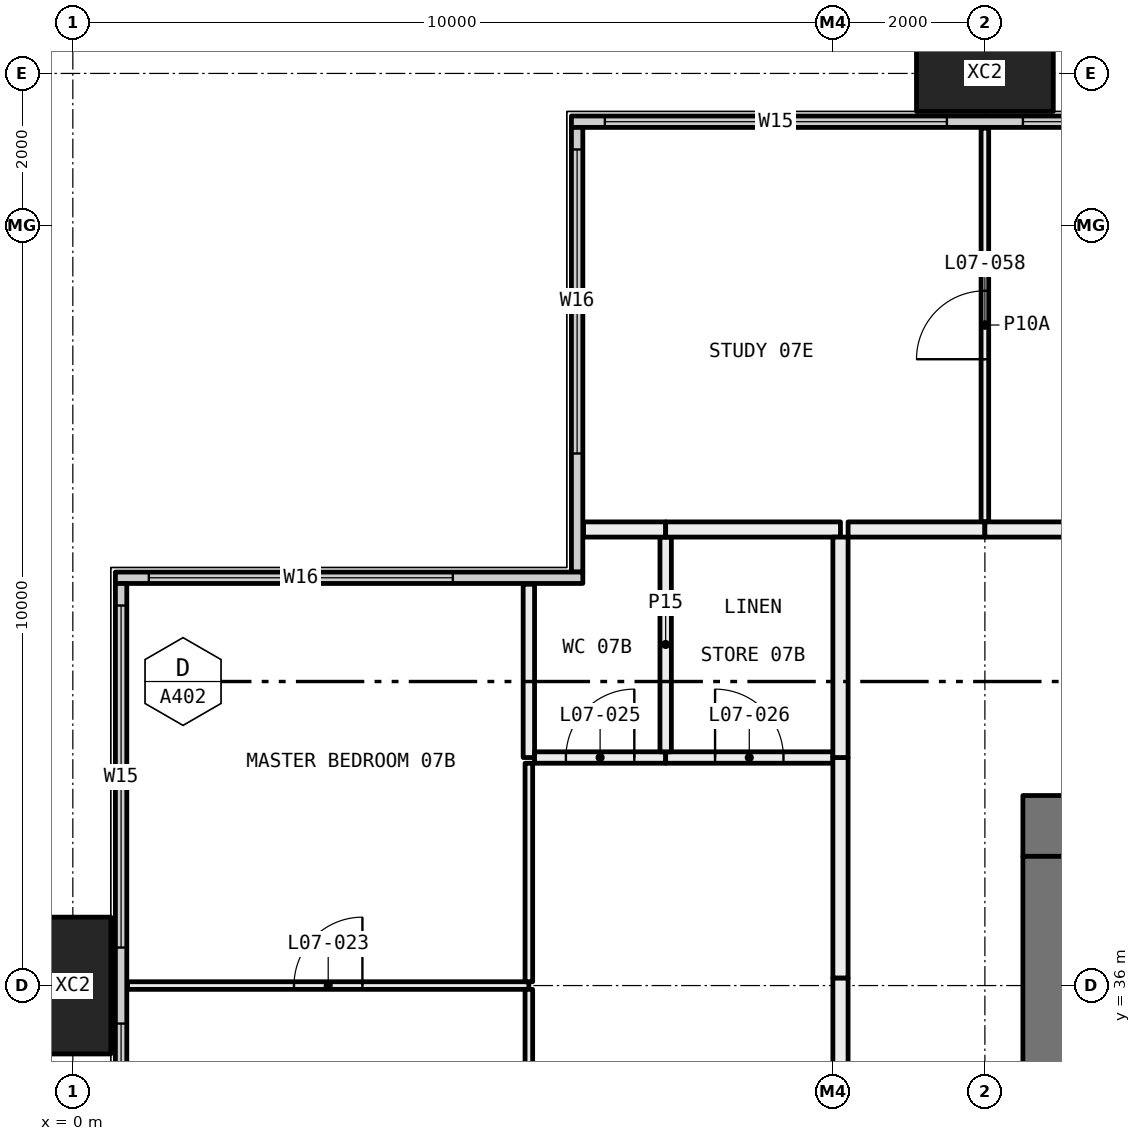
"""IFC4 building model, lengths in metres.
Left out: names, types, materials, properties, quantities, classifications, styles, units other than length and angle.
Written with IfcOpenShell. Run it as: python <this file> out.ifc"""

import sys

from ifc_helpers import new_model, si_unit, direction, frame, frame_2d, origin, origin_2d, place, context, subcontext, project, spatial, rectangle, hollow_rectangle, extrude, element, fill, save


model = new_model("IFC4")
c1 = context("Model", 3, precision=1e-05, world=origin(), true_north=direction((0.0, 1.0)))
c2 = subcontext(c1, "Body", "Model", "MODEL_VIEW")
j1 = project(units=[si_unit("LENGTHUNIT", "METRE"), si_unit("PLANEANGLEUNIT", "RADIAN")], contexts=[c1])
p1 = place(None, origin())
s1 = spatial("IfcSite", under=j1, at=p1, CompositionType="ELEMENT")
p2 = place(p1, origin())
s2 = spatial("IfcBuilding", under=s1, at=p2, CompositionType="ELEMENT")
p3 = place(p2, frame((0.0, 0.0, 36.9)))
s3 = spatial("IfcBuildingStorey", under=s2, at=p3, CompositionType="ELEMENT", Elevation=36.9)
for number, where, z_axis, x_axis in (
    (1, (0.0, 36.0, -0.4), (0.0, 0.0, 1.0), (0.0, 1.0, 0.0)),
    (2, (12.0, 48.0, -0.4), (0.0, 0.0, 1.0), (1.0, 0.0, 0.0)),
):
    element("IfcColumn", number, at=place(p3, frame(where, z_axis=z_axis, x_axis=x_axis)), inside=s3, PredefinedType="COLUMN", context=c2, shape_type="SweptSolid", body=[
        extrude(hollow_rectangle(XDim=1.8, YDim=1.0, WallThickness=0.07, at=origin_2d()), origin(), (0.0, 0.0, 1.0), 3.45),
    ])
p4 = place(p3, frame((6.56, 47.365, 0.0), z_axis=(0.0, 0.0, 1.0), x_axis=(1.0, 0.0, 0.0)))
e3 = element("IfcWall", 3, at=p4, inside=s3, PredefinedType="ELEMENTEDWALL", context=c2, shape_type="SweptSolid", body=[
    extrude(rectangle(XDim=58.88, YDim=0.15, at=frame_2d((29.44, 0.0))), origin(), (0.0, 0.0, 1.0), 3.05),
])
p5 = place(p4, frame((0.44, 0.0, 0.45)))
e4 = element("IfcOpeningElement", 4, at=p5, cuts=e3, PredefinedType="OPENING", context=c2, shape_type="SweptSolid", body=[
    extrude(rectangle(XDim=4.5, YDim=2.55, at=frame_2d((2.25, 1.275))), frame((0.0, 0.085, 0.0), z_axis=(0.0, -1.0, 0.0), x_axis=(1.0, 0.0, 0.0)), (0.0, 0.0, 1.0), 0.17),
])
p6 = place(p4, frame((5.94, 0.0, 0.45)))
e5 = element("IfcOpeningElement", 5, at=p6, cuts=e3, PredefinedType="OPENING", context=c2, shape_type="SweptSolid", body=[
    extrude(rectangle(XDim=3.25, YDim=2.55, at=frame_2d((1.625, 1.275))), frame((0.0, 0.085, 0.0), z_axis=(0.0, -1.0, 0.0), x_axis=(1.0, 0.0, 0.0)), (0.0, 0.0, 1.0), 0.17),
])
p7 = place(p4, frame((13.69, 0.0, 0.45)))
e6 = element("IfcOpeningElement", 6, at=p7, cuts=e3, PredefinedType="OPENING", context=c2, shape_type="SweptSolid", body=[
    extrude(rectangle(XDim=3.25, YDim=2.55, at=frame_2d((1.625, 1.275))), frame((0.0, 0.085, 0.0), z_axis=(0.0, -1.0, 0.0), x_axis=(1.0, 0.0, 0.0)), (0.0, 0.0, 1.0), 0.17),
])
p8 = place(p4, frame((17.94, 0.0, 0.45)))
e7 = element("IfcOpeningElement", 7, at=p8, cuts=e3, PredefinedType="OPENING", context=c2, shape_type="SweptSolid", body=[
    extrude(rectangle(XDim=3.25, YDim=2.55, at=frame_2d((1.625, 1.275))), frame((0.0, 0.085, 0.0), z_axis=(0.0, -1.0, 0.0), x_axis=(1.0, 0.0, 0.0)), (0.0, 0.0, 1.0), 0.17),
])
p9 = place(p4, frame((26.94, 0.0, 0.45)))
e8 = element("IfcOpeningElement", 8, at=p9, cuts=e3, PredefinedType="OPENING", context=c2, shape_type="SweptSolid", body=[
    extrude(rectangle(XDim=2.0, YDim=2.55, at=frame_2d((1.0, 1.275))), frame((0.0, 0.085, 0.0), z_axis=(0.0, -1.0, 0.0), x_axis=(1.0, 0.0, 0.0)), (0.0, 0.0, 1.0), 0.17),
])
p10 = place(p4, frame((29.94, 0.0, 0.45)))
e9 = element("IfcOpeningElement", 9, at=p10, cuts=e3, PredefinedType="OPENING", context=c2, shape_type="SweptSolid", body=[
    extrude(rectangle(XDim=3.25, YDim=2.55, at=frame_2d((1.625, 1.275))), frame((0.0, 0.085, 0.0), z_axis=(0.0, -1.0, 0.0), x_axis=(1.0, 0.0, 0.0)), (0.0, 0.0, 1.0), 0.17),
])
p11 = place(p4, frame((37.69, 0.0, 0.45)))
e10 = element("IfcOpeningElement", 10, at=p11, cuts=e3, PredefinedType="OPENING", context=c2, shape_type="SweptSolid", body=[
    extrude(rectangle(XDim=3.25, YDim=2.55, at=frame_2d((1.625, 1.275))), frame((0.0, 0.085, 0.0), z_axis=(0.0, -1.0, 0.0), x_axis=(1.0, 0.0, 0.0)), (0.0, 0.0, 1.0), 0.17),
])
p12 = place(p4, frame((41.94, 0.0, 0.45)))
e11 = element("IfcOpeningElement", 11, at=p12, cuts=e3, PredefinedType="OPENING", context=c2, shape_type="SweptSolid", body=[
    extrude(rectangle(XDim=3.25, YDim=2.55, at=frame_2d((1.625, 1.275))), frame((0.0, 0.085, 0.0), z_axis=(0.0, -1.0, 0.0), x_axis=(1.0, 0.0, 0.0)), (0.0, 0.0, 1.0), 0.17),
])
p13 = place(p4, frame((50.94, 0.0, 0.45)))
e12 = element("IfcOpeningElement", 12, at=p13, cuts=e3, PredefinedType="OPENING", context=c2, shape_type="SweptSolid", body=[
    extrude(rectangle(XDim=2.0, YDim=2.55, at=frame_2d((1.0, 1.275))), frame((0.0, 0.085, 0.0), z_axis=(0.0, -1.0, 0.0), x_axis=(1.0, 0.0, 0.0)), (0.0, 0.0, 1.0), 0.17),
])
p14 = place(p4, frame((53.94, 0.0, 0.45)))
e13 = element("IfcOpeningElement", 13, at=p14, cuts=e3, PredefinedType="OPENING", context=c2, shape_type="SweptSolid", body=[
    extrude(rectangle(XDim=4.5, YDim=2.55, at=frame_2d((2.25, 1.275))), frame((0.0, 0.085, 0.0), z_axis=(0.0, -1.0, 0.0), x_axis=(1.0, 0.0, 0.0)), (0.0, 0.0, 1.0), 0.17),
])
p15 = place(p3, frame((6.635, 41.44, 0.0), z_axis=(0.0, 0.0, 1.0), x_axis=(0.0, 1.0, 0.0)))
e14 = element("IfcWall", 14, at=p15, inside=s3, PredefinedType="ELEMENTEDWALL", context=c2, shape_type="SweptSolid", body=[
    extrude(rectangle(XDim=5.85, YDim=0.15, at=frame_2d((2.925, 0.0))), origin(), (0.0, 0.0, 1.0), 3.05),
])
p16 = place(p15, frame((1.56, 0.0, 0.45)))
e15 = element("IfcOpeningElement", 15, at=p16, cuts=e14, PredefinedType="OPENING", context=c2, shape_type="SweptSolid", body=[
    extrude(rectangle(XDim=4.0, YDim=2.55, at=frame_2d((2.0, 1.275))), frame((0.0, 0.085, 0.0), z_axis=(0.0, -1.0, 0.0), x_axis=(1.0, 0.0, 0.0)), (0.0, 0.0, 1.0), 0.17),
])
p17 = place(p3, frame((0.56, 41.365, 0.0), z_axis=(0.0, 0.0, 1.0), x_axis=(1.0, 0.0, 0.0)))
e16 = element("IfcWall", 16, at=p17, inside=s3, PredefinedType="ELEMENTEDWALL", context=c2, shape_type="SweptSolid", body=[
    extrude(rectangle(XDim=6.15, YDim=0.15, at=frame_2d((3.075, 0.0))), origin(), (0.0, 0.0, 1.0), 3.05),
])
p18 = place(p17, frame((0.44, 0.0, 0.45)))
e17 = element("IfcOpeningElement", 17, at=p18, cuts=e16, PredefinedType="OPENING", context=c2, shape_type="SweptSolid", body=[
    extrude(rectangle(XDim=4.0, YDim=2.55, at=frame_2d((2.0, 1.275))), frame((0.0, 0.085, 0.0), z_axis=(0.0, -1.0, 0.0), x_axis=(1.0, 0.0, 0.0)), (0.0, 0.0, 1.0), 0.17),
])
p19 = place(p3, frame((0.635, 6.71, 0.0), z_axis=(0.0, 0.0, 1.0), x_axis=(0.0, 1.0, 0.0)))
e18 = element("IfcWall", 18, at=p19, inside=s3, PredefinedType="ELEMENTEDWALL", context=c2, shape_type="SweptSolid", body=[
    extrude(rectangle(XDim=34.58, YDim=0.15, at=frame_2d((17.29, 0.0))), origin(), (0.0, 0.0, 1.0), 3.05),
])
p20 = place(p19, frame((0.29, 0.0, 0.45)))
e19 = element("IfcOpeningElement", 19, at=p20, cuts=e18, PredefinedType="OPENING", context=c2, shape_type="SweptSolid", body=[
    extrude(rectangle(XDim=4.5, YDim=2.55, at=frame_2d((2.25, 1.275))), frame((0.0, 0.085, 0.0), z_axis=(0.0, -1.0, 0.0), x_axis=(1.0, 0.0, 0.0)), (0.0, 0.0, 1.0), 0.17),
])
p21 = place(p19, frame((5.79, 0.0, 0.45)))
e20 = element("IfcOpeningElement", 20, at=p21, cuts=e18, PredefinedType="OPENING", context=c2, shape_type="SweptSolid", body=[
    extrude(rectangle(XDim=3.25, YDim=2.55, at=frame_2d((1.625, 1.275))), frame((0.0, 0.085, 0.0), z_axis=(0.0, -1.0, 0.0), x_axis=(1.0, 0.0, 0.0)), (0.0, 0.0, 1.0), 0.17),
])
p22 = place(p19, frame((13.54, 0.0, 0.45)))
e21 = element("IfcOpeningElement", 21, at=p22, cuts=e18, PredefinedType="OPENING", context=c2, shape_type="SweptSolid", body=[
    extrude(rectangle(XDim=3.25, YDim=2.55, at=frame_2d((1.625, 1.275))), frame((0.0, 0.085, 0.0), z_axis=(0.0, -1.0, 0.0), x_axis=(1.0, 0.0, 0.0)), (0.0, 0.0, 1.0), 0.17),
])
p23 = place(p19, frame((17.79, 0.0, 0.45)))
e22 = element("IfcOpeningElement", 22, at=p23, cuts=e18, PredefinedType="OPENING", context=c2, shape_type="SweptSolid", body=[
    extrude(rectangle(XDim=3.25, YDim=2.55, at=frame_2d((1.625, 1.275))), frame((0.0, 0.085, 0.0), z_axis=(0.0, -1.0, 0.0), x_axis=(1.0, 0.0, 0.0)), (0.0, 0.0, 1.0), 0.17),
])
p24 = place(p19, frame((26.79, 0.0, 0.45)))
e23 = element("IfcOpeningElement", 23, at=p24, cuts=e18, PredefinedType="OPENING", context=c2, shape_type="SweptSolid", body=[
    extrude(rectangle(XDim=2.0, YDim=2.55, at=frame_2d((1.0, 1.275))), frame((0.0, 0.085, 0.0), z_axis=(0.0, -1.0, 0.0), x_axis=(1.0, 0.0, 0.0)), (0.0, 0.0, 1.0), 0.17),
])
p25 = place(p19, frame((29.79, 0.0, 0.45)))
e24 = element("IfcOpeningElement", 24, at=p25, cuts=e18, PredefinedType="OPENING", context=c2, shape_type="SweptSolid", body=[
    extrude(rectangle(XDim=4.5, YDim=2.55, at=frame_2d((2.25, 1.275))), frame((0.0, 0.085, 0.0), z_axis=(0.0, -1.0, 0.0), x_axis=(1.0, 0.0, 0.0)), (0.0, 0.0, 1.0), 0.17),
])
p26 = place(p3, frame((6.0, 36.0, 0.0), z_axis=(0.0, 0.0, 1.0), x_axis=(-1.0, 0.0, 0.0)))
e25 = element("IfcWall", 25, at=p26, inside=s3, PredefinedType="PARTITIONING", context=c2, shape_type="SweptSolid", body=[
    extrude(rectangle(XDim=5.28, YDim=0.1, at=frame_2d((2.64, 0.0))), origin(), (0.0, 0.0, 1.0), 2.45),
])
p27 = place(p26, frame((2.19, 0.0, 0.0)))
e26 = element("IfcOpeningElement", 26, at=p27, cuts=e25, PredefinedType="OPENING", context=c2, shape_type="SweptSolid", body=[
    extrude(rectangle(XDim=0.9, YDim=2.1, at=frame_2d((0.45, 1.05))), frame((0.0, 0.06, 0.0), z_axis=(0.0, -1.0, 0.0), x_axis=(1.0, 0.0, 0.0)), (0.0, 0.0, 1.0), 0.12),
])
p28 = place(p3, frame((6.0, 30.05, 0.0), z_axis=(0.0, 0.0, 1.0), x_axis=(0.0, 1.0, 0.0)))
e27 = element("IfcWall", 27, at=p28, inside=s3, PredefinedType="PARTITIONING", context=c2, shape_type="SweptSolid", body=[
    extrude(rectangle(XDim=5.9, YDim=0.1, at=frame_2d((2.95, 0.0))), origin(), (0.0, 0.0, 1.0), 2.45),
])
p29 = place(p3, frame((6.0, 36.05, 0.0), z_axis=(0.0, 0.0, 1.0), x_axis=(0.0, 1.0, 0.0)))
e28 = element("IfcWall", 28, at=p29, inside=s3, PredefinedType="PARTITIONING", context=c2, shape_type="SweptSolid", body=[
    extrude(rectangle(XDim=2.875, YDim=0.1, at=frame_2d((1.438, 0.0))), origin(), (0.0, 0.0, 1.0), 2.45),
])
p30 = place(p3, frame((6.0, 39.0, 0.0), z_axis=(0.0, 0.0, 1.0), x_axis=(0.0, 1.0, 0.0)))
e29 = element("IfcWall", 29, at=p30, inside=s3, PredefinedType="PARTITIONING", context=c2, shape_type="SweptSolid", body=[
    extrude(rectangle(XDim=2.28, YDim=0.15, at=frame_2d((1.14, 0.0))), origin(), (0.0, 0.0, 1.0), 3.05),
])
p31 = place(p3, frame((7.8, 39.0, 0.0), z_axis=(0.0, 0.0, 1.0), x_axis=(-1.0, 0.0, 0.0)))
e30 = element("IfcWall", 30, at=p31, inside=s3, PredefinedType="PARTITIONING", context=c2, shape_type="SweptSolid", body=[
    extrude(rectangle(XDim=1.725, YDim=0.15, at=frame_2d((0.863, 0.0))), origin(), (0.0, 0.0, 1.0), 3.05),
])
p32 = place(p31, frame((0.413, 0.0, 0.0)))
e31 = element("IfcOpeningElement", 31, at=p32, cuts=e30, PredefinedType="OPENING", context=c2, shape_type="SweptSolid", body=[
    extrude(rectangle(XDim=0.9, YDim=2.1, at=frame_2d((0.45, 1.05))), frame((0.0, 0.085, 0.0), z_axis=(0.0, -1.0, 0.0), x_axis=(1.0, 0.0, 0.0)), (0.0, 0.0, 1.0), 0.17),
])
p33 = place(p3, frame((10.0, 39.0, 0.0), z_axis=(0.0, 0.0, 1.0), x_axis=(-1.0, 0.0, 0.0)))
e32 = element("IfcWall", 32, at=p33, inside=s3, PredefinedType="PARTITIONING", context=c2, shape_type="SweptSolid", body=[
    extrude(rectangle(XDim=2.2, YDim=0.15, at=frame_2d((1.1, 0.0))), origin(), (0.0, 0.0, 1.0), 3.05),
])
p34 = place(p33, frame((0.65, 0.0, 0.0)))
e33 = element("IfcOpeningElement", 33, at=p34, cuts=e32, PredefinedType="OPENING", context=c2, shape_type="SweptSolid", body=[
    extrude(rectangle(XDim=0.9, YDim=2.1, at=frame_2d((0.45, 1.05))), frame((0.0, 0.085, 0.0), z_axis=(0.0, -1.0, 0.0), x_axis=(1.0, 0.0, 0.0)), (0.0, 0.0, 1.0), 0.17),
])
p35 = place(p3, frame((10.1, 27.0, 0.0), z_axis=(0.0, 0.0, 1.0), x_axis=(0.0, 1.0, 0.0)))
e34 = element("IfcWall", 34, at=p35, inside=s3, PredefinedType="PARTITIONING", context=c2, shape_type="SweptSolid", body=[
    extrude(rectangle(XDim=9.1, YDim=0.2, at=frame_2d((4.55, 0.0))), origin(), (0.0, 0.0, 1.0), 2.45),
])
p36 = place(p3, frame((10.1, 36.1, 0.0), z_axis=(0.0, 0.0, 1.0), x_axis=(0.0, 1.0, 0.0)))
e35 = element("IfcWall", 35, at=p36, inside=s3, PredefinedType="PARTITIONING", context=c2, shape_type="SweptSolid", body=[
    extrude(rectangle(XDim=2.9, YDim=0.2, at=frame_2d((1.45, 0.0))), origin(), (0.0, 0.0, 1.0), 3.05),
])
p37 = place(p3, frame((7.8, 39.075, 0.0), z_axis=(0.0, 0.0, 1.0), x_axis=(0.0, 1.0, 0.0)))
e36 = element("IfcWall", 36, at=p37, inside=s3, PredefinedType="PARTITIONING", context=c2, shape_type="SweptSolid", body=[
    extrude(rectangle(XDim=2.825, YDim=0.15, at=frame_2d((1.413, 0.0))), origin(), (0.0, 0.0, 1.0), 3.05),
])
p38 = place(p3, frame((7.8, 42.0, 0.0), z_axis=(0.0, 0.0, 1.0), x_axis=(-1.0, 0.0, 0.0)))
e37 = element("IfcWall", 37, at=p38, inside=s3, PredefinedType="PARTITIONING", context=c2, shape_type="SweptSolid", body=[
    extrude(rectangle(XDim=1.08, YDim=0.2, at=frame_2d((0.54, 0.0))), origin(), (0.0, 0.0, 1.0), 3.05),
])
p39 = place(p3, frame((10.1, 42.0, 0.0), z_axis=(0.0, 0.0, 1.0), x_axis=(-1.0, 0.0, 0.0)))
e38 = element("IfcWall", 38, at=p39, inside=s3, PredefinedType="PARTITIONING", context=c2, shape_type="SweptSolid", body=[
    extrude(rectangle(XDim=2.3, YDim=0.2, at=frame_2d((1.15, 0.0))), origin(), (0.0, 0.0, 1.0), 3.05),
])
p40 = place(p3, frame((10.1, 39.0, 0.0), z_axis=(0.0, 0.0, 1.0), x_axis=(0.0, 1.0, 0.0)))
e39 = element("IfcWall", 39, at=p40, inside=s3, PredefinedType="PARTITIONING", context=c2, shape_type="SweptSolid", body=[
    extrude(rectangle(XDim=2.9, YDim=0.2, at=frame_2d((1.45, 0.0))), origin(), (0.0, 0.0, 1.0), 3.05),
])
p41 = place(p3, frame((12.0, 42.1, 0.0), z_axis=(0.0, 0.0, 1.0), x_axis=(0.0, 1.0, 0.0)))
e40 = element("IfcWall", 40, at=p41, inside=s3, PredefinedType="PARTITIONING", context=c2, shape_type="SweptSolid", body=[
    extrude(rectangle(XDim=5.18, YDim=0.1, at=frame_2d((2.59, 0.0))), origin(), (0.0, 0.0, 1.0), 3.05),
])
p42 = place(p41, frame((2.14, 0.0, 0.0)))
e41 = element("IfcOpeningElement", 41, at=p42, cuts=e40, PredefinedType="OPENING", context=c2, shape_type="SweptSolid", body=[
    extrude(rectangle(XDim=0.9, YDim=2.1, at=frame_2d((0.45, 1.05))), frame((0.0, 0.06, 0.0), z_axis=(0.0, -1.0, 0.0), x_axis=(1.0, 0.0, 0.0)), (0.0, 0.0, 1.0), 0.12),
])
p43 = place(p3, frame((10.2, 42.0, 0.0), z_axis=(0.0, 0.0, 1.0), x_axis=(1.0, 0.0, 0.0)))
e42 = element("IfcWall", 42, at=p43, inside=s3, PredefinedType="PARTITIONING", context=c2, shape_type="SweptSolid", body=[
    extrude(rectangle(XDim=1.8, YDim=0.2, at=frame_2d((0.9, 0.0))), origin(), (0.0, 0.0, 1.0), 3.05),
])
p44 = place(p3, frame((12.0, 42.0, 0.0), z_axis=(0.0, 0.0, 1.0), x_axis=(1.0, 0.0, 0.0)))
e43 = element("IfcWall", 43, at=p44, inside=s3, PredefinedType="PARTITIONING", context=c2, shape_type="SweptSolid", body=[
    extrude(rectangle(XDim=6.0, YDim=0.2, at=frame_2d((3.0, 0.0))), origin(), (0.0, 0.0, 1.0), 3.05),
])
p45 = place(p44, frame((2.5, 0.0, 0.0)))
e44 = element("IfcOpeningElement", 44, at=p45, cuts=e43, PredefinedType="OPENING", context=c2, shape_type="SweptSolid", body=[
    extrude(rectangle(XDim=1.0, YDim=2.1, at=frame_2d((0.5, 1.05))), frame((0.0, 0.11, 0.0), z_axis=(0.0, -1.0, 0.0), x_axis=(1.0, 0.0, 0.0)), (0.0, 0.0, 1.0), 0.22),
])
p46 = place(p3, frame((12.5, 38.1, 0.0), z_axis=(0.0, 0.0, 1.0), x_axis=(1.0, 0.0, 0.0)))
e45 = element("IfcWall", 45, at=p46, inside=s3, PredefinedType="SHEAR", context=c2, shape_type="SweptSolid", body=[
    extrude(rectangle(XDim=11.0, YDim=0.8, at=frame_2d((5.5, 0.0))), origin(), (0.0, 0.0, 1.0), 3.05),
])
p47 = place(p46, frame((8.4, 0.0, 0.0)))
e46 = element("IfcOpeningElement", 46, at=p47, cuts=e45, PredefinedType="OPENING", context=c2, shape_type="SweptSolid", body=[
    extrude(rectangle(XDim=1.6, YDim=2.1, at=frame_2d((0.8, 1.05))), frame((0.0, 0.41, 0.0), z_axis=(0.0, -1.0, 0.0), x_axis=(1.0, 0.0, 0.0)), (0.0, 0.0, 1.0), 0.82),
])
p48 = place(p3, frame((12.9, 22.3, 0.0), z_axis=(0.0, 0.0, 1.0), x_axis=(0.0, 1.0, 0.0)))
e47 = element("IfcWall", 47, at=p48, inside=s3, PredefinedType="SHEAR", context=c2, shape_type="SweptSolid", body=[
    extrude(rectangle(XDim=15.4, YDim=0.8, at=frame_2d((7.7, 0.0))), origin(), (0.0, 0.0, 1.0), 3.05),
])
p49 = place(p48, frame((8.15, 0.0, 0.0)))
e48 = element("IfcOpeningElement", 48, at=p49, cuts=e47, PredefinedType="OPENING", context=c2, shape_type="SweptSolid", body=[
    extrude(rectangle(XDim=1.6, YDim=2.1, at=frame_2d((0.8, 1.05))), frame((0.0, 0.41, 0.0), z_axis=(0.0, -1.0, 0.0), x_axis=(1.0, 0.0, 0.0)), (0.0, 0.0, 1.0), 0.82),
])
p50 = place(p48, frame((2.05, 0.0, 0.0)))
e49 = element("IfcOpeningElement", 49, at=p50, cuts=e47, PredefinedType="OPENING", context=c2, shape_type="SweptSolid", body=[
    extrude(rectangle(XDim=1.0, YDim=2.1, at=frame_2d((0.5, 1.05))), frame((0.0, 0.41, 0.0), z_axis=(0.0, -1.0, 0.0), x_axis=(1.0, 0.0, 0.0)), (0.0, 0.0, 1.0), 0.82),
])
p51 = place(p5, origin())
e50 = element("IfcWindow", 50, at=p51, inside=s3, PartitioningType="SINGLE_PANEL", PredefinedType="WINDOW", context=c2, shape_type="SweptSolid", body=[
    extrude(rectangle(XDim=4.5, YDim=2.55, at=frame_2d((2.25, 1.275))), frame((0.0, 0.03, 0.0), z_axis=(0.0, -1.0, 0.0), x_axis=(1.0, 0.0, 0.0)), (0.0, 0.0, 1.0), 0.06),
])
fill(e4, e50)
p52 = place(p6, origin())
e51 = element("IfcWindow", 51, at=p52, inside=s3, PartitioningType="SINGLE_PANEL", PredefinedType="WINDOW", context=c2, shape_type="SweptSolid", body=[
    extrude(rectangle(XDim=3.25, YDim=2.55, at=frame_2d((1.625, 1.275))), frame((0.0, 0.03, 0.0), z_axis=(0.0, -1.0, 0.0), x_axis=(1.0, 0.0, 0.0)), (0.0, 0.0, 1.0), 0.06),
])
fill(e5, e51)
p53 = place(p16, origin())
e52 = element("IfcWindow", 52, at=p53, inside=s3, PartitioningType="SINGLE_PANEL", PredefinedType="WINDOW", context=c2, shape_type="SweptSolid", body=[
    extrude(rectangle(XDim=4.0, YDim=2.55, at=frame_2d((2.0, 1.275))), frame((0.0, 0.03, 0.0), z_axis=(0.0, -1.0, 0.0), x_axis=(1.0, 0.0, 0.0)), (0.0, 0.0, 1.0), 0.06),
])
fill(e15, e52)
p54 = place(p18, origin())
e53 = element("IfcWindow", 53, at=p54, inside=s3, PartitioningType="SINGLE_PANEL", PredefinedType="WINDOW", context=c2, shape_type="SweptSolid", body=[
    extrude(rectangle(XDim=4.0, YDim=2.55, at=frame_2d((2.0, 1.275))), frame((0.0, 0.03, 0.0), z_axis=(0.0, -1.0, 0.0), x_axis=(1.0, 0.0, 0.0)), (0.0, 0.0, 1.0), 0.06),
])
fill(e17, e53)
p55 = place(p24, origin())
e54 = element("IfcWindow", 54, at=p55, inside=s3, PartitioningType="SINGLE_PANEL", PredefinedType="WINDOW", context=c2, shape_type="SweptSolid", body=[
    extrude(rectangle(XDim=2.0, YDim=2.55, at=frame_2d((1.0, 1.275))), frame((0.0, 0.03, 0.0), z_axis=(0.0, -1.0, 0.0), x_axis=(1.0, 0.0, 0.0)), (0.0, 0.0, 1.0), 0.06),
])
fill(e23, e54)
p56 = place(p25, origin())
e55 = element("IfcWindow", 55, at=p56, inside=s3, PartitioningType="SINGLE_PANEL", PredefinedType="WINDOW", context=c2, shape_type="SweptSolid", body=[
    extrude(rectangle(XDim=4.5, YDim=2.55, at=frame_2d((2.25, 1.275))), frame((0.0, 0.03, 0.0), z_axis=(0.0, -1.0, 0.0), x_axis=(1.0, 0.0, 0.0)), (0.0, 0.0, 1.0), 0.06),
])
fill(e24, e55)
p57 = place(p27, frame((0.9, 0.0, 0.0), x_axis=(-1.0, 0.0, 0.0)))
e56 = element("IfcDoor", 56, at=p57, inside=s3, OperationType="SINGLE_SWING_LEFT", PredefinedType="DOOR", context=c2, shape_type="SweptSolid", body=[
    extrude(rectangle(XDim=0.9, YDim=2.1, at=frame_2d((0.45, 1.05))), frame((0.0, 0.025, 0.0), z_axis=(0.0, -1.0, 0.0), x_axis=(1.0, 0.0, 0.0)), (0.0, 0.0, 1.0), 0.05),
])
fill(e26, e56)
p58 = place(p32, frame((0.9, 0.0, 0.0), x_axis=(-1.0, 0.0, 0.0)))
e57 = element("IfcDoor", 57, at=p58, inside=s3, OperationType="SINGLE_SWING_LEFT", PredefinedType="DOOR", context=c2, shape_type="SweptSolid", body=[
    extrude(rectangle(XDim=0.9, YDim=2.1, at=frame_2d((0.45, 1.05))), frame((0.0, 0.025, 0.0), z_axis=(0.0, -1.0, 0.0), x_axis=(1.0, 0.0, 0.0)), (0.0, 0.0, 1.0), 0.05),
])
fill(e31, e57)
p59 = place(p34, frame((0.9, 0.0, 0.0), x_axis=(-1.0, 0.0, 0.0)))
e58 = element("IfcDoor", 58, at=p59, inside=s3, OperationType="SINGLE_SWING_RIGHT", PredefinedType="DOOR", context=c2, shape_type="SweptSolid", body=[
    extrude(rectangle(XDim=0.9, YDim=2.1, at=frame_2d((0.45, 1.05))), frame((0.0, 0.025, 0.0), z_axis=(0.0, -1.0, 0.0), x_axis=(1.0, 0.0, 0.0)), (0.0, 0.0, 1.0), 0.05),
])
fill(e33, e58)
p60 = place(p42, origin())
e59 = element("IfcDoor", 59, at=p60, inside=s3, OperationType="SINGLE_SWING_RIGHT", PredefinedType="DOOR", context=c2, shape_type="SweptSolid", body=[
    extrude(rectangle(XDim=0.9, YDim=2.1, at=frame_2d((0.45, 1.05))), frame((0.0, 0.025, 0.0), z_axis=(0.0, -1.0, 0.0), x_axis=(1.0, 0.0, 0.0)), (0.0, 0.0, 1.0), 0.05),
])
fill(e41, e59)
save(model, sys.argv[1])
